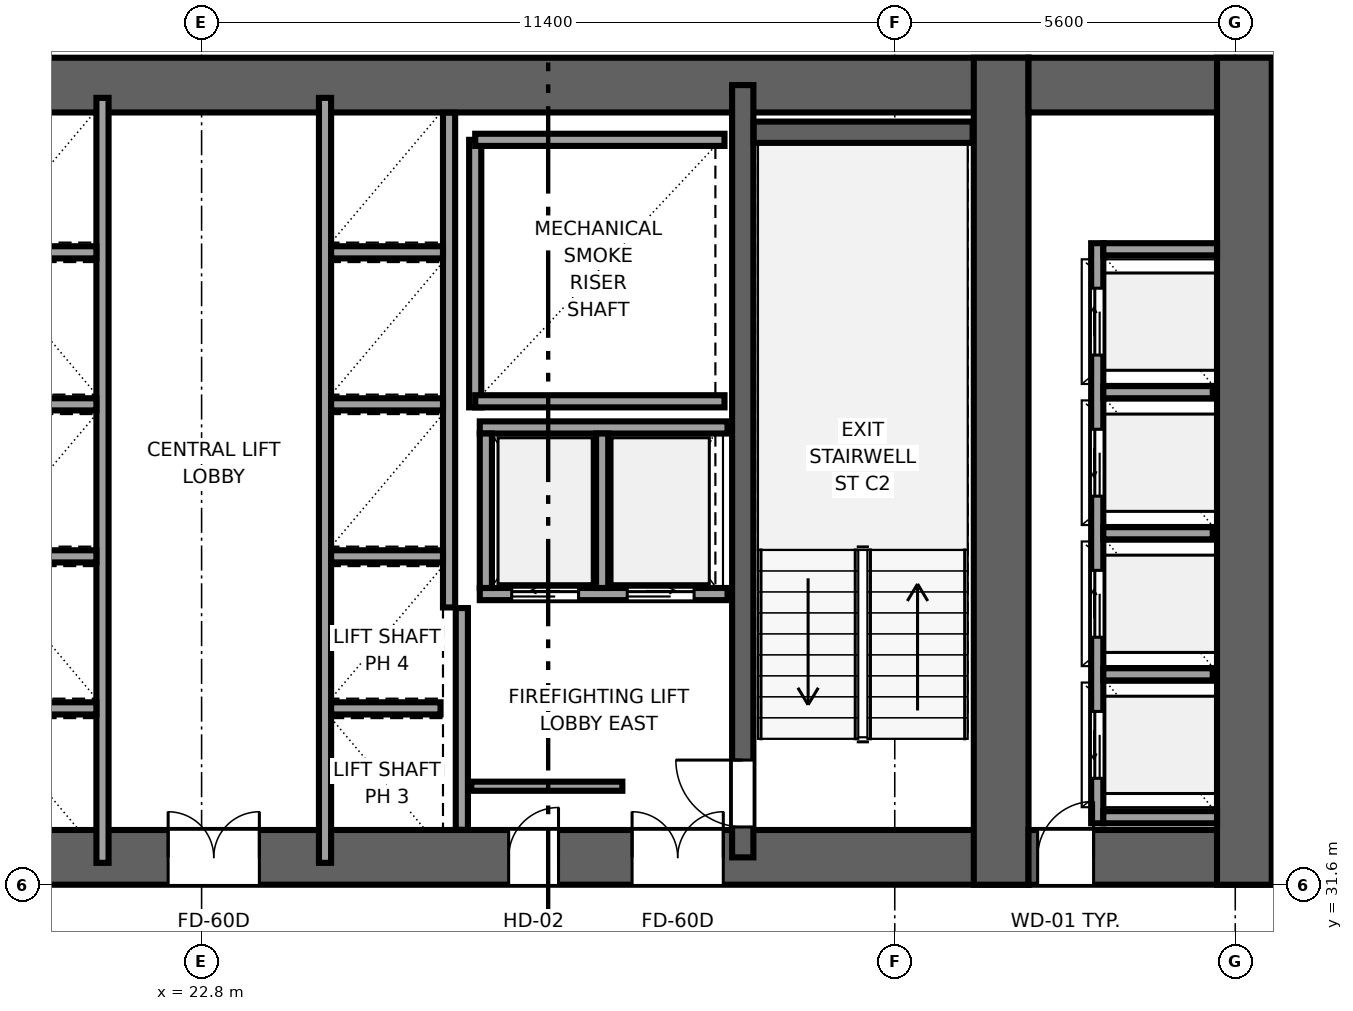
"""IFC4 building model, lengths in metres.
Left out: names, types, materials, properties, quantities, classifications, styles, units other than length and angle.
Written with IfcOpenShell. Run it as: python <this file> out.ifc"""

import sys

from ifc_helpers import new_model, si_unit, direction, frame, frame_2d, origin, place, context, subcontext, project, spatial, rectangle, extrude, source, transform, mapped, element, fill, save


model = new_model("IFC4")
c1 = context("Model", 3, precision=1e-05, world=origin(), true_north=direction((0.0, 1.0)))
c2 = subcontext(c1, "Body", "Model", "MODEL_VIEW")
j1 = project(units=[si_unit("LENGTHUNIT", "METRE"), si_unit("PLANEANGLEUNIT", "RADIAN")], contexts=[c1])
p1 = place(None, origin())
s1 = spatial("IfcSite", under=j1, at=p1, CompositionType="ELEMENT")
p2 = place(p1, origin())
s2 = spatial("IfcBuilding", under=s1, at=p2, CompositionType="ELEMENT")
p3 = place(p2, frame((0.0, 0.0, 49.75)))
s3 = spatial("IfcBuildingStorey", under=s2, at=p3, CompositionType="ELEMENT", Elevation=49.75)
p4 = place(p3, frame((9.6, 32.05, 0.0), z_axis=(0.0, 0.0, 1.0), x_axis=(1.0, 0.0, 0.0)))
e1 = element("IfcWall", 1, at=p4, inside=s3, PredefinedType="SHEAR", context=c2, shape_type="SweptSolid", body=[
    extrude(rectangle(XDim=26.8, YDim=0.9, at=frame_2d((13.4, 0.0))), origin(), (0.0, 0.0, 1.0), 3.55),
])
p5 = place(p4, frame((6.52, 0.0, 0.0), z_axis=(0.0, 0.0, 1.0), x_axis=(-1.0, 0.0, 0.0)))
e2 = element("IfcOpeningElement", 2, at=p5, cuts=e1, PredefinedType="OPENING", context=c2, shape_type="SweptSolid", body=[
    extrude(rectangle(XDim=1.5, YDim=2.04, at=frame_2d((0.75, 1.02))), frame((0.0, 0.46, 0.0), z_axis=(0.0, -1.0, 0.0), x_axis=(1.0, 0.0, 0.0)), (0.0, 0.0, 1.0), 0.92),
])
p6 = place(p4, frame((14.15, 0.0, 0.0), z_axis=(0.0, 0.0, 1.0), x_axis=(-1.0, 0.0, 0.0)))
e3 = element("IfcOpeningElement", 3, at=p6, cuts=e1, PredefinedType="OPENING", context=c2, shape_type="SweptSolid", body=[
    extrude(rectangle(XDim=1.5, YDim=2.04, at=frame_2d((0.75, 1.02))), frame((0.0, 0.46, 0.0), z_axis=(0.0, -1.0, 0.0), x_axis=(1.0, 0.0, 0.0)), (0.0, 0.0, 1.0), 0.92),
])
p7 = place(p4, frame((21.78, 0.0, 0.0), z_axis=(0.0, 0.0, 1.0), x_axis=(-1.0, 0.0, 0.0)))
e4 = element("IfcOpeningElement", 4, at=p7, cuts=e1, PredefinedType="OPENING", context=c2, shape_type="SweptSolid", body=[
    extrude(rectangle(XDim=1.5, YDim=2.04, at=frame_2d((0.75, 1.02))), frame((0.0, 0.46, 0.0), z_axis=(0.0, -1.0, 0.0), x_axis=(1.0, 0.0, 0.0)), (0.0, 0.0, 1.0), 0.92),
])
p8 = place(p4, frame((8.57, 0.0, 0.0), z_axis=(0.0, 0.0, 1.0), x_axis=(-1.0, 0.0, 0.0)))
e5 = element("IfcOpeningElement", 5, at=p8, cuts=e1, PredefinedType="OPENING", context=c2, shape_type="SweptSolid", body=[
    extrude(rectangle(XDim=0.82, YDim=2.01, at=frame_2d((0.41, 1.005))), frame((0.0, 0.46, 0.0), z_axis=(0.0, -1.0, 0.0), x_axis=(1.0, 0.0, 0.0)), (0.0, 0.0, 1.0), 0.92),
])
p9 = place(p4, frame((19.07, 0.0, 0.0), z_axis=(0.0, 0.0, 1.0), x_axis=(-1.0, 0.0, 0.0)))
e6 = element("IfcOpeningElement", 6, at=p9, cuts=e1, PredefinedType="OPENING", context=c2, shape_type="SweptSolid", body=[
    extrude(rectangle(XDim=0.82, YDim=2.01, at=frame_2d((0.41, 1.005))), frame((0.0, 0.46, 0.0), z_axis=(0.0, -1.0, 0.0), x_axis=(1.0, 0.0, 0.0)), (0.0, 0.0, 1.0), 0.92),
])
p10 = place(p3, frame((9.6, 44.75, 0.0), z_axis=(0.0, 0.0, 1.0), x_axis=(1.0, 0.0, 0.0)))
e7 = element("IfcWall", 7, at=p10, inside=s3, PredefinedType="SHEAR", context=c2, shape_type="SweptSolid", body=[
    extrude(rectangle(XDim=26.8, YDim=0.9, at=frame_2d((13.4, 0.0))), origin(), (0.0, 0.0, 1.0), 3.55),
])
p11 = place(p3, frame((35.95, 31.6, 0.0), z_axis=(0.0, 0.0, 1.0), x_axis=(0.0, 1.0, 0.0)))
e8 = element("IfcWall", 8, at=p11, inside=s3, PredefinedType="SHEAR", context=c2, shape_type="SweptSolid", body=[
    extrude(rectangle(XDim=13.6, YDim=0.9, at=frame_2d((6.8, 0.0))), origin(), (0.0, 0.0, 1.0), 3.55),
])
p12 = place(p3, frame((31.7, 32.05, 0.0), z_axis=(0.0, 0.0, 1.0), x_axis=(0.0, 1.0, 0.0)))
e9 = element("IfcWall", 9, at=p12, inside=s3, PredefinedType="SHEAR", context=c2, shape_type="SweptSolid", body=[
    extrude(rectangle(XDim=12.7, YDim=0.35, at=frame_2d((6.35, 0.0))), origin(), (0.0, 0.0, 1.0), 3.55),
])
p13 = place(p12, frame((1.6, 0.0, 0.0), z_axis=(0.0, 0.0, 1.0), x_axis=(-1.0, 0.0, 0.0)))
e10 = element("IfcOpeningElement", 10, at=p13, cuts=e9, PredefinedType="OPENING", context=c2, shape_type="SweptSolid", body=[
    extrude(rectangle(XDim=1.1, YDim=2.12, at=frame_2d((0.55, 1.06))), frame((0.0, 0.185, 0.0), z_axis=(0.0, -1.0, 0.0), x_axis=(1.0, 0.0, 0.0)), (0.0, 0.0, 1.0), 0.37),
])
p14 = place(p3, frame((36.4, 32.05, 0.0), z_axis=(0.0, 0.0, 1.0), x_axis=(1.0, 0.0, 0.0)))
e11 = element("IfcWall", 11, at=p14, inside=s3, PredefinedType="SHEAR", context=c2, shape_type="SweptSolid", body=[
    extrude(rectangle(XDim=4.0, YDim=0.9, at=frame_2d((2.0, 0.0))), origin(), (0.0, 0.0, 1.0), 3.55),
])
p15 = place(p14, frame((1.07, 0.0, 0.0), z_axis=(0.0, 0.0, 1.0), x_axis=(-1.0, 0.0, 0.0)))
e12 = element("IfcOpeningElement", 12, at=p15, cuts=e11, PredefinedType="OPENING", context=c2, shape_type="SweptSolid", body=[
    extrude(rectangle(XDim=0.92, YDim=2.01, at=frame_2d((0.46, 1.005))), frame((0.0, 0.46, 0.0), z_axis=(0.0, -1.0, 0.0), x_axis=(1.0, 0.0, 0.0)), (0.0, 0.0, 1.0), 0.92),
])
p16 = place(p3, frame((36.4, 44.75, 0.0), z_axis=(0.0, 0.0, 1.0), x_axis=(1.0, 0.0, 0.0)))
e13 = element("IfcWall", 13, at=p16, inside=s3, PredefinedType="SHEAR", context=c2, shape_type="SweptSolid", body=[
    extrude(rectangle(XDim=4.0, YDim=0.9, at=frame_2d((2.0, 0.0))), origin(), (0.0, 0.0, 1.0), 3.55),
])
p17 = place(p3, frame((39.95, 31.6, 0.0), z_axis=(0.0, 0.0, 1.0), x_axis=(0.0, 1.0, 0.0)))
e14 = element("IfcWall", 14, at=p17, inside=s3, PredefinedType="SHEAR", context=c2, shape_type="SweptSolid", body=[
    extrude(rectangle(XDim=13.6, YDim=0.9, at=frame_2d((6.8, 0.0))), origin(), (0.0, 0.0, 1.0), 3.55),
])
p18 = place(p3, frame((31.88, 43.975, 0.0), z_axis=(0.0, 0.0, 1.0), x_axis=(1.0, 0.0, 0.0)))
e15 = element("IfcWall", 15, at=p18, inside=s3, PredefinedType="SHEAR", context=c2, shape_type="SweptSolid", body=[
    extrude(rectangle(XDim=3.6, YDim=0.35, at=frame_2d((1.8, 0.0))), origin(), (0.0, 0.0, 1.0), 3.55),
])
p19 = place(p3, frame((27.3, 39.45, 0.0), z_axis=(0.0, 0.0, 1.0), x_axis=(0.0, 1.0, 0.0)))
e16 = element("IfcWall", 16, at=p19, inside=s3, PredefinedType="SOLIDWALL", context=c2, shape_type="SweptSolid", body=[
    extrude(rectangle(XDim=4.4, YDim=0.2, at=frame_2d((2.2, 0.0))), origin(), (0.0, 0.0, 1.0), 3.37),
])
for number, where, z_axis, x_axis in (
    (17, (27.3, 39.55, 0.0), (0.0, 0.0, 1.0), (1.0, 0.0, 0.0)),
    (18, (27.3, 43.85, 0.0), (0.0, 0.0, 1.0), (1.0, 0.0, 0.0)),
):
    element("IfcWall", number, at=place(p3, frame(where, z_axis=z_axis, x_axis=x_axis)), inside=s3, PredefinedType="SOLIDWALL", context=c2, shape_type="SweptSolid", body=[
        extrude(rectangle(XDim=4.1, YDim=0.2, at=frame_2d((2.05, 0.0))), origin(), (0.0, 0.0, 1.0), 3.37),
    ])
p20 = place(p3, frame((27.08, 32.504, 0.0), z_axis=(0.0, 0.0, 1.0), x_axis=(0.0, 1.0, 0.0)))
e19 = element("IfcWall", 19, at=p20, inside=s3, PredefinedType="SOLIDWALL", context=c2, shape_type="SweptSolid", body=[
    extrude(rectangle(XDim=3.646, YDim=0.2, at=frame_2d((1.823, 0.0))), origin(), (0.0, 0.0, 1.0), 3.37),
])
p21 = place(p3, frame((21.17, 31.96, 0.0), z_axis=(0.0, 0.0, 1.0), x_axis=(0.0, 1.0, 0.0)))
e20 = element("IfcWall", 20, at=p21, inside=s3, PredefinedType="SOLIDWALL", context=c2, shape_type="SweptSolid", body=[
    extrude(rectangle(XDim=12.58, YDim=0.2, at=frame_2d((6.29, 0.0))), origin(), (0.0, 0.0, 1.0), 3.37),
])
p22 = place(p3, frame((19.27, 34.5, 0.0), z_axis=(0.0, 0.0, 1.0), x_axis=(1.0, 0.0, 0.0)))
e21 = element("IfcWall", 21, at=p22, inside=s3, PredefinedType="SOLIDWALL", context=c2, shape_type="SweptSolid", body=[
    extrude(rectangle(XDim=1.8, YDim=0.2, at=frame_2d((0.9, 0.0))), origin(), (0.0, 0.0, 1.0), 3.37),
])
for number, where, z_axis, x_axis in (
    (22, (19.23, 37.0, 0.0), (0.0, 0.0, 1.0), (1.0, 0.0, 0.0)),
    (23, (19.23, 39.5, 0.0), (0.0, 0.0, 1.0), (1.0, 0.0, 0.0)),
    (24, (19.23, 42.0, 0.0), (0.0, 0.0, 1.0), (1.0, 0.0, 0.0)),
):
    element("IfcWall", number, at=place(p3, frame(where, z_axis=z_axis, x_axis=x_axis)), inside=s3, PredefinedType="SOLIDWALL", context=c2, shape_type="SweptSolid", body=[
        extrude(rectangle(XDim=1.84, YDim=0.2, at=frame_2d((0.92, 0.0))), origin(), (0.0, 0.0, 1.0), 3.37),
    ])
p23 = place(p3, frame((27.375, 36.38, 0.0), z_axis=(0.0, 0.0, 1.0), x_axis=(1.0, 0.0, 0.0)))
e25 = element("IfcWall", 25, at=p23, inside=s3, PredefinedType="SOLIDWALL", context=c2, shape_type="SweptSolid", body=[
    extrude(rectangle(XDim=4.075, YDim=0.2, at=frame_2d((2.038, 0.0))), origin(), (0.0, 0.0, 1.0), 3.37),
])
p24 = place(p23, frame((0.525, 0.0, 0.0)))
e26 = element("IfcOpeningElement", 26, at=p24, cuts=e25, PredefinedType="OPENING", context=c2, shape_type="SweptSolid", body=[
    extrude(rectangle(XDim=1.1, YDim=2.12, at=frame_2d((0.55, 1.06))), frame((0.0, 0.11, 0.0), z_axis=(0.0, -1.0, 0.0), x_axis=(1.0, 0.0, 0.0)), (0.0, 0.0, 1.0), 0.22),
])
p25 = place(p23, frame((2.425, 0.0, 0.0)))
e27 = element("IfcOpeningElement", 27, at=p25, cuts=e25, PredefinedType="OPENING", context=c2, shape_type="SweptSolid", body=[
    extrude(rectangle(XDim=1.1, YDim=2.12, at=frame_2d((0.55, 1.06))), frame((0.0, 0.11, 0.0), z_axis=(0.0, -1.0, 0.0), x_axis=(1.0, 0.0, 0.0)), (0.0, 0.0, 1.0), 0.22),
])
p26 = place(p3, frame((27.375, 39.12, 0.0), z_axis=(0.0, 0.0, 1.0), x_axis=(1.0, 0.0, 0.0)))
e28 = element("IfcWall", 28, at=p26, inside=s3, PredefinedType="SOLIDWALL", context=c2, shape_type="SweptSolid", body=[
    extrude(rectangle(XDim=4.075, YDim=0.2, at=frame_2d((2.038, 0.0))), origin(), (0.0, 0.0, 1.0), 3.37),
])
for number, where, z_axis, x_axis in (
    (29, (27.475, 36.48, 0.0), (0.0, 0.0, 1.0), (0.0, 1.0, 0.0)),
    (30, (29.387, 36.48, 0.0), (0.0, 0.0, 1.0), (0.0, 1.0, 0.0)),
):
    element("IfcWall", number, at=place(p3, frame(where, z_axis=z_axis, x_axis=x_axis)), inside=s3, PredefinedType="SOLIDWALL", context=c2, shape_type="SweptSolid", body=[
        extrude(rectangle(XDim=2.54, YDim=0.2, at=frame_2d((1.27, 0.0))), origin(), (0.0, 0.0, 1.0), 3.37),
    ])
p27 = place(p3, frame((24.83, 31.96, 0.0), z_axis=(0.0, 0.0, 1.0), x_axis=(0.0, 1.0, 0.0)))
e31 = element("IfcWall", 31, at=p27, inside=s3, PredefinedType="SOLIDWALL", context=c2, shape_type="SweptSolid", body=[
    extrude(rectangle(XDim=12.58, YDim=0.2, at=frame_2d((6.29, 0.0))), origin(), (0.0, 0.0, 1.0), 3.37),
])
p28 = place(p3, frame((26.87, 36.16, 0.0), z_axis=(0.0, 0.0, 1.0), x_axis=(0.0, 1.0, 0.0)))
e32 = element("IfcWall", 32, at=p28, inside=s3, PredefinedType="SOLIDWALL", context=c2, shape_type="SweptSolid", body=[
    extrude(rectangle(XDim=8.136, YDim=0.2, at=frame_2d((4.068, 0.0))), origin(), (0.0, 0.0, 1.0), 3.37),
])
p29 = place(p3, frame((24.93, 34.5, 0.0), z_axis=(0.0, 0.0, 1.0), x_axis=(1.0, 0.0, 0.0)))
e33 = element("IfcWall", 33, at=p29, inside=s3, PredefinedType="SOLIDWALL", context=c2, shape_type="SweptSolid", body=[
    extrude(rectangle(XDim=1.8, YDim=0.2, at=frame_2d((0.9, 0.0))), origin(), (0.0, 0.0, 1.0), 3.37),
])
for number, where, z_axis, x_axis in (
    (34, (24.93, 37.0, 0.0), (0.0, 0.0, 1.0), (1.0, 0.0, 0.0)),
    (35, (24.93, 39.5, 0.0), (0.0, 0.0, 1.0), (1.0, 0.0, 0.0)),
    (36, (24.93, 42.0, 0.0), (0.0, 0.0, 1.0), (1.0, 0.0, 0.0)),
):
    element("IfcWall", number, at=place(p3, frame(where, z_axis=z_axis, x_axis=x_axis)), inside=s3, PredefinedType="SOLIDWALL", context=c2, shape_type="SweptSolid", body=[
        extrude(rectangle(XDim=1.84, YDim=0.2, at=frame_2d((0.92, 0.0))), origin(), (0.0, 0.0, 1.0), 3.37),
    ])
p30 = place(p3, frame((37.53, 32.61, 0.0), z_axis=(0.0, 0.0, 1.0), x_axis=(0.0, 1.0, 0.0)))
e37 = element("IfcWall", 37, at=p30, inside=s3, PredefinedType="SOLIDWALL", context=c2, shape_type="SweptSolid", body=[
    extrude(rectangle(XDim=9.54, YDim=0.2, at=frame_2d((4.77, 0.0))), origin(), (0.0, 0.0, 1.0), 3.37),
])
p31 = place(p30, frame((0.74, 0.0, 0.0)))
e38 = element("IfcOpeningElement", 38, at=p31, cuts=e37, PredefinedType="OPENING", context=c2, shape_type="SweptSolid", body=[
    extrude(rectangle(XDim=1.1, YDim=2.12, at=frame_2d((0.55, 1.06))), frame((0.0, 0.11, 0.0), z_axis=(0.0, -1.0, 0.0), x_axis=(1.0, 0.0, 0.0)), (0.0, 0.0, 1.0), 0.22),
])
p32 = place(p30, frame((3.06, 0.0, 0.0)))
e39 = element("IfcOpeningElement", 39, at=p32, cuts=e37, PredefinedType="OPENING", context=c2, shape_type="SweptSolid", body=[
    extrude(rectangle(XDim=1.1, YDim=2.12, at=frame_2d((0.55, 1.06))), frame((0.0, 0.11, 0.0), z_axis=(0.0, -1.0, 0.0), x_axis=(1.0, 0.0, 0.0)), (0.0, 0.0, 1.0), 0.22),
])
p33 = place(p30, frame((5.38, 0.0, 0.0)))
e40 = element("IfcOpeningElement", 40, at=p33, cuts=e37, PredefinedType="OPENING", context=c2, shape_type="SweptSolid", body=[
    extrude(rectangle(XDim=1.1, YDim=2.12, at=frame_2d((0.55, 1.06))), frame((0.0, 0.11, 0.0), z_axis=(0.0, -1.0, 0.0), x_axis=(1.0, 0.0, 0.0)), (0.0, 0.0, 1.0), 0.22),
])
p34 = place(p30, frame((7.7, 0.0, 0.0)))
e41 = element("IfcOpeningElement", 41, at=p34, cuts=e37, PredefinedType="OPENING", context=c2, shape_type="SweptSolid", body=[
    extrude(rectangle(XDim=1.1, YDim=2.12, at=frame_2d((0.55, 1.06))), frame((0.0, 0.11, 0.0), z_axis=(0.0, -1.0, 0.0), x_axis=(1.0, 0.0, 0.0)), (0.0, 0.0, 1.0), 0.22),
])
for number, where, z_axis, x_axis in (
    (42, (37.63, 32.71, 0.0), (0.0, 0.0, 1.0), (1.0, 0.0, 0.0)),
    (43, (37.63, 42.05, 0.0), (0.0, 0.0, 1.0), (1.0, 0.0, 0.0)),
):
    element("IfcWall", number, at=place(p3, frame(where, z_axis=z_axis, x_axis=x_axis)), inside=s3, PredefinedType="SOLIDWALL", context=c2, shape_type="SweptSolid", body=[
        extrude(rectangle(XDim=1.87, YDim=0.2, at=frame_2d((0.935, 0.0))), origin(), (0.0, 0.0, 1.0), 3.37),
    ])
for number, where, z_axis, x_axis in (
    (44, (37.63, 35.06, 0.0), (0.0, 0.0, 1.0), (1.0, 0.0, 0.0)),
    (45, (37.63, 37.38, 0.0), (0.0, 0.0, 1.0), (1.0, 0.0, 0.0)),
    (46, (37.63, 39.7, 0.0), (0.0, 0.0, 1.0), (1.0, 0.0, 0.0)),
):
    element("IfcWall", number, at=place(p3, frame(where, z_axis=z_axis, x_axis=x_axis)), inside=s3, PredefinedType="SOLIDWALL", context=c2, shape_type="SweptSolid", body=[
        extrude(rectangle(XDim=1.8, YDim=0.2, at=frame_2d((0.9, 0.0))), origin(), (0.0, 0.0, 1.0), 3.37),
    ])
p35 = place(p3, frame((27.235, 33.22, 0.0), z_axis=(0.0, 0.0, 1.0), x_axis=(1.0, 0.0, 0.0)))
e47 = element("IfcWall", 47, at=p35, inside=s3, PredefinedType="PARTITIONING", context=c2, shape_type="SweptSolid", body=[
    extrude(rectangle(XDim=2.485, YDim=0.15, at=frame_2d((1.242, 0.0))), origin(), (0.0, 0.0, 1.0), 3.37),
])
m1 = source(origin(), c2, "Body", "SweptSolid", [
    extrude(rectangle(XDim=1.1, YDim=2.12, at=frame_2d((0.55, 1.06))), frame((0.0, 0.025, 0.0), z_axis=(0.0, -1.0, 0.0), x_axis=(1.0, 0.0, 0.0)), (0.0, 0.0, 1.0), 0.05),
])
p36 = place(p13, origin())
e48 = element("IfcDoor", 48, at=p36, inside=s3, OperationType="SINGLE_SWING_RIGHT", PredefinedType="DOOR", context=c2, shape_type="MappedRepresentation", body=[
    mapped(m1, transform((0.0, 0.0, 0.0), x_axis=(1.0, 0.0, 0.0), y_axis=(0.0, 1.0, 0.0), z_axis=(0.0, 0.0, 1.0), scale=1.0)),
])
fill(e10, e48)
m2 = source(origin(), c2, "Body", "SweptSolid", [
    extrude(rectangle(XDim=1.5, YDim=2.04, at=frame_2d((0.75, 1.02))), frame((0.0, 0.025, 0.0), z_axis=(0.0, -1.0, 0.0), x_axis=(1.0, 0.0, 0.0)), (0.0, 0.0, 1.0), 0.05),
])
p37 = place(p6, origin())
e49 = element("IfcDoor", 49, at=p37, inside=s3, OperationType="DOUBLE_DOOR_SINGLE_SWING", PredefinedType="DOOR", context=c2, shape_type="MappedRepresentation", body=[
    mapped(m2, transform((0.0, 0.0, 0.0), x_axis=(1.0, 0.0, 0.0), y_axis=(0.0, 1.0, 0.0), z_axis=(0.0, 0.0, 1.0), scale=1.0)),
])
fill(e3, e49)
p38 = place(p7, origin())
e50 = element("IfcDoor", 50, at=p38, inside=s3, OperationType="DOUBLE_DOOR_SINGLE_SWING", PredefinedType="DOOR", context=c2, shape_type="MappedRepresentation", body=[
    mapped(m2, transform((0.0, 0.0, 0.0), x_axis=(1.0, 0.0, 0.0), y_axis=(0.0, 1.0, 0.0), z_axis=(0.0, 0.0, 1.0), scale=1.0)),
])
fill(e4, e50)
m3 = source(origin(), c2, "Body", "SweptSolid", [
    extrude(rectangle(XDim=0.82, YDim=2.01, at=frame_2d((0.41, 1.005))), frame((0.0, 0.025, 0.0), z_axis=(0.0, -1.0, 0.0), x_axis=(1.0, 0.0, 0.0)), (0.0, 0.0, 1.0), 0.05),
])
p39 = place(p9, origin())
e51 = element("IfcDoor", 51, at=p39, inside=s3, OperationType="SINGLE_SWING_RIGHT", PredefinedType="DOOR", context=c2, shape_type="MappedRepresentation", body=[
    mapped(m3, transform((0.0, 0.0, 0.0), x_axis=(1.0, 0.0, 0.0), y_axis=(0.0, 1.0, 0.0), z_axis=(0.0, 0.0, 1.0), scale=1.0)),
])
fill(e6, e51)
m4 = source(origin(), c2, "Body", "SweptSolid", [
    extrude(rectangle(XDim=0.92, YDim=2.01, at=frame_2d((0.46, 1.005))), frame((0.0, 0.025, 0.0), z_axis=(0.0, -1.0, 0.0), x_axis=(1.0, 0.0, 0.0)), (0.0, 0.0, 1.0), 0.05),
])
p40 = place(p15, origin())
e52 = element("IfcDoor", 52, at=p40, inside=s3, OperationType="SINGLE_SWING_RIGHT", PredefinedType="DOOR", context=c2, shape_type="MappedRepresentation", body=[
    mapped(m4, transform((0.0, 0.0, 0.0), x_axis=(1.0, 0.0, 0.0), y_axis=(0.0, 1.0, 0.0), z_axis=(0.0, 0.0, 1.0), scale=1.0)),
])
fill(e12, e52)
m5 = source(origin(), c2, "Body", "SweptSolid", [
    extrude(rectangle(XDim=1.1, YDim=2.12, at=frame_2d((0.55, 1.06))), frame((0.0, 0.025, 0.0), z_axis=(0.0, -1.0, 0.0), x_axis=(1.0, 0.0, 0.0)), (0.0, 0.0, 1.0), 0.05),
])
p41 = place(p24, origin())
e53 = element("IfcDoor", 53, at=p41, inside=s3, OperationType="SLIDING_TO_LEFT", PredefinedType="DOOR", context=c2, shape_type="MappedRepresentation", body=[
    mapped(m5, transform((0.0, 0.0, 0.0), x_axis=(1.0, 0.0, 0.0), y_axis=(0.0, 1.0, 0.0), z_axis=(0.0, 0.0, 1.0), scale=1.0)),
])
fill(e26, e53)
p42 = place(p25, origin())
e54 = element("IfcDoor", 54, at=p42, inside=s3, OperationType="SLIDING_TO_RIGHT", PredefinedType="DOOR", context=c2, shape_type="MappedRepresentation", body=[
    mapped(m5, transform((0.0, 0.0, 0.0), x_axis=(1.0, 0.0, 0.0), y_axis=(0.0, 1.0, 0.0), z_axis=(0.0, 0.0, 1.0), scale=1.0)),
])
fill(e27, e54)
p43 = place(p31, origin())
e55 = element("IfcDoor", 55, at=p43, inside=s3, OperationType="SLIDING_TO_LEFT", PredefinedType="DOOR", context=c2, shape_type="MappedRepresentation", body=[
    mapped(m5, transform((0.0, 0.0, 0.0), x_axis=(1.0, 0.0, 0.0), y_axis=(0.0, 1.0, 0.0), z_axis=(0.0, 0.0, 1.0), scale=1.0)),
])
fill(e38, e55)
p44 = place(p32, origin())
e56 = element("IfcDoor", 56, at=p44, inside=s3, OperationType="SLIDING_TO_RIGHT", PredefinedType="DOOR", context=c2, shape_type="MappedRepresentation", body=[
    mapped(m5, transform((0.0, 0.0, 0.0), x_axis=(1.0, 0.0, 0.0), y_axis=(0.0, 1.0, 0.0), z_axis=(0.0, 0.0, 1.0), scale=1.0)),
])
fill(e39, e56)
p45 = place(p33, origin())
e57 = element("IfcDoor", 57, at=p45, inside=s3, OperationType="SLIDING_TO_LEFT", PredefinedType="DOOR", context=c2, shape_type="MappedRepresentation", body=[
    mapped(m5, transform((0.0, 0.0, 0.0), x_axis=(1.0, 0.0, 0.0), y_axis=(0.0, 1.0, 0.0), z_axis=(0.0, 0.0, 1.0), scale=1.0)),
])
fill(e40, e57)
p46 = place(p34, origin())
e58 = element("IfcDoor", 58, at=p46, inside=s3, OperationType="SLIDING_TO_RIGHT", PredefinedType="DOOR", context=c2, shape_type="MappedRepresentation", body=[
    mapped(m5, transform((0.0, 0.0, 0.0), x_axis=(1.0, 0.0, 0.0), y_axis=(0.0, 1.0, 0.0), z_axis=(0.0, 0.0, 1.0), scale=1.0)),
])
fill(e41, e58)
save(model, sys.argv[1])
